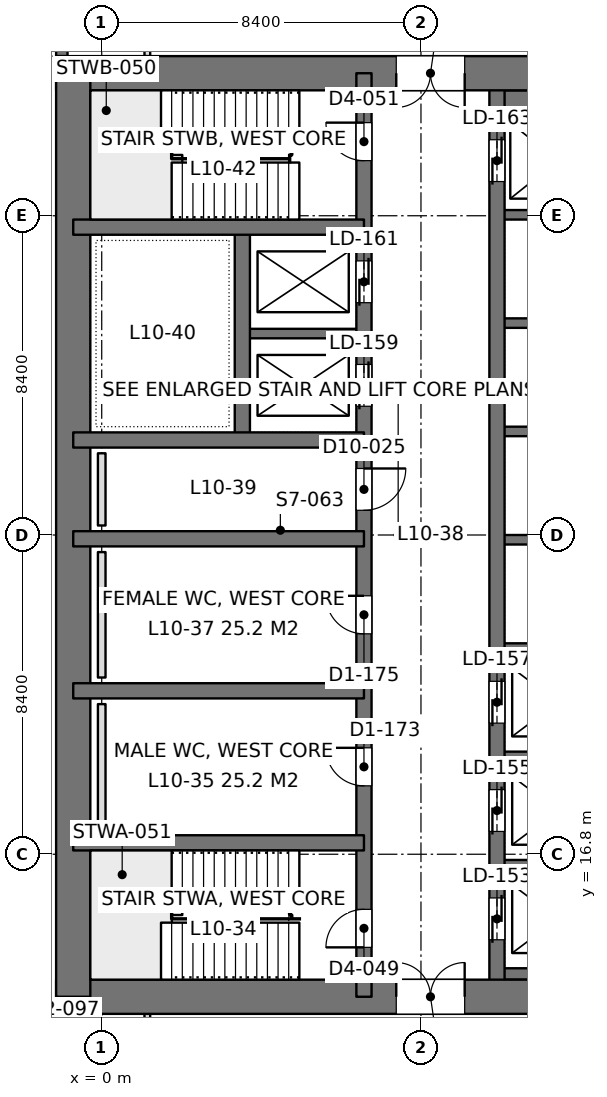
"""IFC4 building model, lengths in metres.
Left out: names, types, materials, properties, quantities, classifications, styles, units other than length and angle.
Written with IfcOpenShell. Run it as: python <this file> out.ifc"""

import sys

from ifc_helpers import new_model, si_unit, direction, frame, frame_2d, origin, place, context, subcontext, project, spatial, rectangle, extrude, element, fill, save


model = new_model("IFC4")
c1 = context("Model", 3, precision=1e-05, world=origin(), true_north=direction((0.0, 1.0)))
c2 = subcontext(c1, "Body", "Model", "MODEL_VIEW")
j1 = project(units=[si_unit("LENGTHUNIT", "METRE"), si_unit("PLANEANGLEUNIT", "RADIAN")], contexts=[c1])
p1 = place(None, origin())
s1 = spatial("IfcSite", under=j1, at=p1, CompositionType="ELEMENT")
p2 = place(p1, origin())
s2 = spatial("IfcBuilding", under=s1, at=p2, CompositionType="ELEMENT")
p3 = place(p2, frame((0.0, 0.0, 45.9)))
s3 = spatial("IfcBuildingStorey", under=s2, at=p3, CompositionType="ELEMENT", Elevation=45.9)
p4 = place(p3, frame((-1.2, 13.05, 0.0), z_axis=(0.0, 0.0, 1.0), x_axis=(1.0, 0.0, 0.0)))
e1 = element("IfcWall", 1, at=p4, inside=s3, PredefinedType="SHEAR", context=c2, shape_type="SweptSolid", body=[
    extrude(rectangle(XDim=18.0, YDim=0.9, at=frame_2d((9.0, 0.0))), origin(), (0.0, 0.0, 1.0), 4.5),
])
p5 = place(p4, frame((8.95, 0.0, 0.0)))
e2 = element("IfcOpeningElement", 2, at=p5, cuts=e1, PredefinedType="OPENING", context=c2, shape_type="SweptSolid", body=[
    extrude(rectangle(XDim=1.8, YDim=2.4, at=frame_2d((0.9, 1.2))), frame((0.0, 0.46, 0.0), z_axis=(0.0, -1.0, 0.0), x_axis=(1.0, 0.0, 0.0)), (0.0, 0.0, 1.0), 0.92),
])
p6 = place(p3, frame((-1.2, 37.35, 0.0), z_axis=(0.0, 0.0, 1.0), x_axis=(1.0, 0.0, 0.0)))
e3 = element("IfcWall", 3, at=p6, inside=s3, PredefinedType="SHEAR", context=c2, shape_type="SweptSolid", body=[
    extrude(rectangle(XDim=18.0, YDim=0.9, at=frame_2d((9.0, 0.0))), origin(), (0.0, 0.0, 1.0), 4.5),
])
p7 = place(p6, frame((8.95, 0.0, 0.0)))
e4 = element("IfcOpeningElement", 4, at=p7, cuts=e3, PredefinedType="OPENING", context=c2, shape_type="SweptSolid", body=[
    extrude(rectangle(XDim=1.8, YDim=2.4, at=frame_2d((0.9, 1.2))), frame((0.0, 0.46, 0.0), z_axis=(0.0, -1.0, 0.0), x_axis=(1.0, 0.0, 0.0)), (0.0, 0.0, 1.0), 0.92),
])
p8 = place(p3, frame((-0.75, 13.05, 0.0), z_axis=(0.0, 0.0, 1.0), x_axis=(0.0, 1.0, 0.0)))
e5 = element("IfcWall", 5, at=p8, inside=s3, PredefinedType="SHEAR", context=c2, shape_type="SweptSolid", body=[
    extrude(rectangle(XDim=24.3, YDim=0.9, at=frame_2d((12.15, 0.0))), origin(), (0.0, 0.0, 1.0), 4.5),
])
p9 = place(p3, frame((6.9, 13.05, 0.0), z_axis=(0.0, 0.0, 1.0), x_axis=(0.0, 1.0, 0.0)))
e6 = element("IfcWall", 6, at=p9, inside=s3, PredefinedType="SHEAR", context=c2, shape_type="SweptSolid", body=[
    extrude(rectangle(XDim=24.3, YDim=0.4, at=frame_2d((12.15, 0.0))), origin(), (0.0, 0.0, 1.0), 4.5),
])
p10 = place(p9, frame((1.3, 0.0, 0.0)))
e7 = element("IfcOpeningElement", 7, at=p10, cuts=e6, PredefinedType="OPENING", context=c2, shape_type="SweptSolid", body=[
    extrude(rectangle(XDim=1.0, YDim=2.2, at=frame_2d((0.5, 1.1))), frame((0.0, 0.21, 0.0), z_axis=(0.0, -1.0, 0.0), x_axis=(1.0, 0.0, 0.0)), (0.0, 0.0, 1.0), 0.42),
])
p11 = place(p9, frame((22.0, 0.0, 0.0)))
e8 = element("IfcOpeningElement", 8, at=p11, cuts=e6, PredefinedType="OPENING", context=c2, shape_type="SweptSolid", body=[
    extrude(rectangle(XDim=1.0, YDim=2.2, at=frame_2d((0.5, 1.1))), frame((0.0, 0.21, 0.0), z_axis=(0.0, -1.0, 0.0), x_axis=(1.0, 0.0, 0.0)), (0.0, 0.0, 1.0), 0.42),
])
p12 = place(p9, frame((5.55, 0.0, 0.0)))
e9 = element("IfcOpeningElement", 9, at=p12, cuts=e6, PredefinedType="OPENING", context=c2, shape_type="SweptSolid", body=[
    extrude(rectangle(XDim=1.0, YDim=2.2, at=frame_2d((0.5, 1.1))), frame((0.0, 0.21, 0.0), z_axis=(0.0, -1.0, 0.0), x_axis=(1.0, 0.0, 0.0)), (0.0, 0.0, 1.0), 0.42),
])
p13 = place(p9, frame((9.55, 0.0, 0.0)))
e10 = element("IfcOpeningElement", 10, at=p13, cuts=e6, PredefinedType="OPENING", context=c2, shape_type="SweptSolid", body=[
    extrude(rectangle(XDim=1.0, YDim=2.2, at=frame_2d((0.5, 1.1))), frame((0.0, 0.21, 0.0), z_axis=(0.0, -1.0, 0.0), x_axis=(1.0, 0.0, 0.0)), (0.0, 0.0, 1.0), 0.42),
])
p14 = place(p9, frame((12.8, 0.0, 0.0)))
e11 = element("IfcOpeningElement", 11, at=p14, cuts=e6, PredefinedType="OPENING", context=c2, shape_type="SweptSolid", body=[
    extrude(rectangle(XDim=1.1, YDim=2.2, at=frame_2d((0.55, 1.1))), frame((0.0, 0.21, 0.0), z_axis=(0.0, -1.0, 0.0), x_axis=(1.0, 0.0, 0.0)), (0.0, 0.0, 1.0), 0.42),
])
p15 = place(p9, frame((15.538, 0.0, 0.0)))
e12 = element("IfcOpeningElement", 12, at=p15, cuts=e6, PredefinedType="OPENING", context=c2, shape_type="SweptSolid", body=[
    extrude(rectangle(XDim=1.1, YDim=2.2, at=frame_2d((0.55, 1.1))), frame((0.0, 0.21, 0.0), z_axis=(0.0, -1.0, 0.0), x_axis=(1.0, 0.0, 0.0)), (0.0, 0.0, 1.0), 0.42),
])
p16 = place(p9, frame((18.262, 0.0, 0.0)))
e13 = element("IfcOpeningElement", 13, at=p16, cuts=e6, PredefinedType="OPENING", context=c2, shape_type="SweptSolid", body=[
    extrude(rectangle(XDim=1.1, YDim=2.2, at=frame_2d((0.55, 1.1))), frame((0.0, 0.21, 0.0), z_axis=(0.0, -1.0, 0.0), x_axis=(1.0, 0.0, 0.0)), (0.0, 0.0, 1.0), 0.42),
])
p17 = place(p3, frame((10.4, 13.05, 0.0), z_axis=(0.0, 0.0, 1.0), x_axis=(0.0, 1.0, 0.0)))
e14 = element("IfcWall", 14, at=p17, inside=s3, PredefinedType="SHEAR", context=c2, shape_type="SweptSolid", body=[
    extrude(rectangle(XDim=24.3, YDim=0.4, at=frame_2d((12.15, 0.0))), origin(), (0.0, 0.0, 1.0), 4.5),
])
p18 = place(p17, frame((1.5, 0.0, 0.0)))
e15 = element("IfcOpeningElement", 15, at=p18, cuts=e14, PredefinedType="OPENING", context=c2, shape_type="SweptSolid", body=[
    extrude(rectangle(XDim=1.1, YDim=2.2, at=frame_2d((0.55, 1.1))), frame((0.0, 0.21, 0.0), z_axis=(0.0, -1.0, 0.0), x_axis=(1.0, 0.0, 0.0)), (0.0, 0.0, 1.0), 0.42),
])
p19 = place(p17, frame((4.35, 0.0, 0.0)))
e16 = element("IfcOpeningElement", 16, at=p19, cuts=e14, PredefinedType="OPENING", context=c2, shape_type="SweptSolid", body=[
    extrude(rectangle(XDim=1.1, YDim=2.2, at=frame_2d((0.55, 1.1))), frame((0.0, 0.21, 0.0), z_axis=(0.0, -1.0, 0.0), x_axis=(1.0, 0.0, 0.0)), (0.0, 0.0, 1.0), 0.42),
])
p20 = place(p17, frame((7.2, 0.0, 0.0)))
e17 = element("IfcOpeningElement", 17, at=p20, cuts=e14, PredefinedType="OPENING", context=c2, shape_type="SweptSolid", body=[
    extrude(rectangle(XDim=1.1, YDim=2.2, at=frame_2d((0.55, 1.1))), frame((0.0, 0.21, 0.0), z_axis=(0.0, -1.0, 0.0), x_axis=(1.0, 0.0, 0.0)), (0.0, 0.0, 1.0), 0.42),
])
p21 = place(p17, frame((21.45, 0.0, 0.0)))
e18 = element("IfcOpeningElement", 18, at=p21, cuts=e14, PredefinedType="OPENING", context=c2, shape_type="SweptSolid", body=[
    extrude(rectangle(XDim=1.1, YDim=2.2, at=frame_2d((0.55, 1.1))), frame((0.0, 0.21, 0.0), z_axis=(0.0, -1.0, 0.0), x_axis=(1.0, 0.0, 0.0)), (0.0, 0.0, 1.0), 0.42),
])
for number, where, z_axis, x_axis in (
    (19, (-0.75, 17.1, 0.0), (0.0, 0.0, 1.0), (1.0, 0.0, 0.0)),
    (20, (-0.75, 21.1, 0.0), (0.0, 0.0, 1.0), (1.0, 0.0, 0.0)),
    (21, (-0.75, 25.1, 0.0), (0.0, 0.0, 1.0), (1.0, 0.0, 0.0)),
    (22, (-0.75, 27.7, 0.0), (0.0, 0.0, 1.0), (1.0, 0.0, 0.0)),
    (23, (-0.75, 33.3, 0.0), (0.0, 0.0, 1.0), (1.0, 0.0, 0.0)),
):
    element("IfcWall", number, at=place(p3, frame(where, z_axis=z_axis, x_axis=x_axis)), inside=s3, PredefinedType="SHEAR", context=c2, shape_type="SweptSolid", body=[
        extrude(rectangle(XDim=7.65, YDim=0.4, at=frame_2d((3.825, 0.0))), origin(), (0.0, 0.0, 1.0), 4.5),
    ])
p22 = place(p3, frame((3.7, 27.7, 0.0), z_axis=(0.0, 0.0, 1.0), x_axis=(0.0, 1.0, 0.0)))
e24 = element("IfcWall", 24, at=p22, inside=s3, PredefinedType="SHEAR", context=c2, shape_type="SweptSolid", body=[
    extrude(rectangle(XDim=5.6, YDim=0.4, at=frame_2d((2.8, 0.0))), origin(), (0.0, 0.0, 1.0), 4.5),
])
p23 = place(p3, frame((3.7, 30.5, 0.0), z_axis=(0.0, 0.0, 1.0), x_axis=(1.0, 0.0, 0.0)))
e25 = element("IfcWall", 25, at=p23, inside=s3, PredefinedType="SHEAR", context=c2, shape_type="SweptSolid", body=[
    extrude(rectangle(XDim=3.2, YDim=0.25, at=frame_2d((1.6, 0.0))), origin(), (0.0, 0.0, 1.0), 4.5),
])
p24 = place(p3, frame((10.4, 13.65, 0.0), z_axis=(0.0, 0.0, 1.0), x_axis=(1.0, 0.0, 0.0)))
e26 = element("IfcWall", 26, at=p24, inside=s3, PredefinedType="SHEAR", context=c2, shape_type="SweptSolid", body=[
    extrude(rectangle(XDim=3.2, YDim=0.3, at=frame_2d((1.6, 0.0))), origin(), (0.0, 0.0, 1.0), 4.5),
])
for number, where, z_axis, x_axis in (
    (27, (10.4, 16.525, 0.0), (0.0, 0.0, 1.0), (1.0, 0.0, 0.0)),
    (28, (10.4, 19.375, 0.0), (0.0, 0.0, 1.0), (1.0, 0.0, 0.0)),
    (29, (10.4, 22.225, 0.0), (0.0, 0.0, 1.0), (1.0, 0.0, 0.0)),
    (30, (10.4, 25.075, 0.0), (0.0, 0.0, 1.0), (1.0, 0.0, 0.0)),
    (31, (10.4, 27.925, 0.0), (0.0, 0.0, 1.0), (1.0, 0.0, 0.0)),
    (32, (10.4, 30.775, 0.0), (0.0, 0.0, 1.0), (1.0, 0.0, 0.0)),
    (33, (10.4, 33.625, 0.0), (0.0, 0.0, 1.0), (1.0, 0.0, 0.0)),
):
    element("IfcWall", number, at=place(p3, frame(where, z_axis=z_axis, x_axis=x_axis)), inside=s3, PredefinedType="SHEAR", context=c2, shape_type="SweptSolid", body=[
        extrude(rectangle(XDim=3.2, YDim=0.25, at=frame_2d((1.6, 0.0))), origin(), (0.0, 0.0, 1.0), 4.5),
    ])
p25 = place(p3, frame((10.4, 36.625, 0.0), z_axis=(0.0, 0.0, 1.0), x_axis=(1.0, 0.0, 0.0)))
e34 = element("IfcWall", 34, at=p25, inside=s3, PredefinedType="SHEAR", context=c2, shape_type="SweptSolid", body=[
    extrude(rectangle(XDim=3.2, YDim=0.55, at=frame_2d((1.6, 0.0))), origin(), (0.0, 0.0, 1.0), 4.5),
])
p26 = place(p3, frame((-1.05, 8.4, 0.0), z_axis=(0.0, 0.0, 1.0), x_axis=(0.0, 1.0, 0.0)))
e35 = element("IfcWall", 35, at=p26, inside=s3, PredefinedType="SOLIDWALL", context=c2, shape_type="SweptSolid", body=[
    extrude(rectangle(XDim=4.2, YDim=0.3, at=frame_2d((2.1, 0.0))), origin(), (0.0, 0.0, 1.0), 4.34),
])
p27 = place(p26, frame((0.9, 0.0, 0.9)))
e36 = element("IfcOpeningElement", 36, at=p27, cuts=e35, PredefinedType="OPENING", context=c2, shape_type="SweptSolid", body=[
    extrude(rectangle(XDim=2.4, YDim=1.9, at=frame_2d((1.2, 0.95))), frame((0.0, 0.16, 0.0), z_axis=(0.0, -1.0, 0.0), x_axis=(1.0, 0.0, 0.0)), (0.0, 0.0, 1.0), 0.32),
])
p28 = place(p3, frame((-1.05, 37.8, 0.0), z_axis=(0.0, 0.0, 1.0), x_axis=(0.0, 1.0, 0.0)))
e37 = element("IfcWall", 37, at=p28, inside=s3, PredefinedType="SOLIDWALL", context=c2, shape_type="SweptSolid", body=[
    extrude(rectangle(XDim=4.2, YDim=0.3, at=frame_2d((2.1, 0.0))), origin(), (0.0, 0.0, 1.0), 4.34),
])
p29 = place(p28, frame((0.9, 0.0, 0.9)))
e38 = element("IfcOpeningElement", 38, at=p29, cuts=e37, PredefinedType="OPENING", context=c2, shape_type="SweptSolid", body=[
    extrude(rectangle(XDim=2.4, YDim=1.9, at=frame_2d((1.2, 0.95))), frame((0.0, 0.16, 0.0), z_axis=(0.0, -1.0, 0.0), x_axis=(1.0, 0.0, 0.0)), (0.0, 0.0, 1.0), 0.32),
])
p30 = place(p3, frame((1.2, 10.8, 0.0), z_axis=(0.0, 0.0, 1.0), x_axis=(0.0, 1.0, 0.0)))
e39 = element("IfcWall", 39, at=p30, inside=s3, PredefinedType="PARTITIONING", context=c2, shape_type="SweptSolid", body=[
    extrude(rectangle(XDim=1.802, YDim=0.15, at=frame_2d((0.901, 0.0))), origin(), (0.0, 0.0, 1.0), 4.34),
])
p31 = place(p3, frame((1.2, 37.8, 0.0), z_axis=(0.0, 0.0, 1.0), x_axis=(0.0, 1.0, 0.0)))
e40 = element("IfcWall", 40, at=p31, inside=s3, PredefinedType="PARTITIONING", context=c2, shape_type="SweptSolid", body=[
    extrude(rectangle(XDim=1.8, YDim=0.15, at=frame_2d((0.9, 0.0))), origin(), (0.0, 0.0, 1.0), 4.34),
])
for number, where, z_axis, x_axis in (
    (41, (0.0, 17.45, 0.0), (0.0, 0.0, 1.0), (0.0, 1.0, 0.0)),
    (42, (0.0, 21.45, 0.0), (0.0, 0.0, 1.0), (0.0, 1.0, 0.0)),
):
    element("IfcWall", number, at=place(p3, frame(where, z_axis=z_axis, x_axis=x_axis)), inside=s3, PredefinedType="PLUMBINGWALL", context=c2, shape_type="SweptSolid", body=[
        extrude(rectangle(XDim=3.3, YDim=0.2, at=frame_2d((1.65, 0.0))), origin(), (0.0, 0.0, 1.0), 1.2),
    ])
p32 = place(p3, frame((0.0, 25.45, 0.0), z_axis=(0.0, 0.0, 1.0), x_axis=(0.0, 1.0, 0.0)))
e43 = element("IfcWall", 43, at=p32, inside=s3, PredefinedType="PLUMBINGWALL", context=c2, shape_type="SweptSolid", body=[
    extrude(rectangle(XDim=1.9, YDim=0.2, at=frame_2d((0.95, 0.0))), origin(), (0.0, 0.0, 1.0), 1.2),
])
p33 = place(p5, origin())
e44 = element("IfcDoor", 44, at=p33, inside=s3, OperationType="DOUBLE_DOOR_SINGLE_SWING", PredefinedType="DOOR", context=c2, shape_type="SweptSolid", body=[
    extrude(rectangle(XDim=1.8, YDim=2.4, at=frame_2d((0.9, 1.2))), frame((0.0, 0.025, 0.0), z_axis=(0.0, -1.0, 0.0), x_axis=(1.0, 0.0, 0.0)), (0.0, 0.0, 1.0), 0.05),
])
fill(e2, e44)
p34 = place(p7, frame((1.8, 0.0, 0.0), z_axis=(0.0, 0.0, 1.0), x_axis=(-1.0, 0.0, 0.0)))
e45 = element("IfcDoor", 45, at=p34, inside=s3, OperationType="DOUBLE_DOOR_SINGLE_SWING", PredefinedType="DOOR", context=c2, shape_type="SweptSolid", body=[
    extrude(rectangle(XDim=1.8, YDim=2.4, at=frame_2d((0.9, 1.2))), frame((0.0, 0.025, 0.0), z_axis=(0.0, -1.0, 0.0), x_axis=(1.0, 0.0, 0.0)), (0.0, 0.0, 1.0), 0.05),
])
fill(e4, e45)
p35 = place(p10, origin())
e46 = element("IfcDoor", 46, at=p35, inside=s3, OperationType="SINGLE_SWING_LEFT", PredefinedType="DOOR", context=c2, shape_type="SweptSolid", body=[
    extrude(rectangle(XDim=1.0, YDim=2.2, at=frame_2d((0.5, 1.1))), frame((0.0, 0.025, 0.0), z_axis=(0.0, -1.0, 0.0), x_axis=(1.0, 0.0, 0.0)), (0.0, 0.0, 1.0), 0.05),
])
fill(e7, e46)
p36 = place(p11, origin())
e47 = element("IfcDoor", 47, at=p36, inside=s3, OperationType="SINGLE_SWING_RIGHT", PredefinedType="DOOR", context=c2, shape_type="SweptSolid", body=[
    extrude(rectangle(XDim=1.0, YDim=2.2, at=frame_2d((0.5, 1.1))), frame((0.0, 0.025, 0.0), z_axis=(0.0, -1.0, 0.0), x_axis=(1.0, 0.0, 0.0)), (0.0, 0.0, 1.0), 0.05),
])
fill(e8, e47)
p37 = place(p12, origin())
e48 = element("IfcDoor", 48, at=p37, inside=s3, OperationType="SINGLE_SWING_RIGHT", PredefinedType="DOOR", context=c2, shape_type="SweptSolid", body=[
    extrude(rectangle(XDim=1.0, YDim=2.2, at=frame_2d((0.5, 1.1))), frame((0.0, 0.025, 0.0), z_axis=(0.0, -1.0, 0.0), x_axis=(1.0, 0.0, 0.0)), (0.0, 0.0, 1.0), 0.05),
])
fill(e9, e48)
p38 = place(p13, origin())
e49 = element("IfcDoor", 49, at=p38, inside=s3, OperationType="SINGLE_SWING_RIGHT", PredefinedType="DOOR", context=c2, shape_type="SweptSolid", body=[
    extrude(rectangle(XDim=1.0, YDim=2.2, at=frame_2d((0.5, 1.1))), frame((0.0, 0.025, 0.0), z_axis=(0.0, -1.0, 0.0), x_axis=(1.0, 0.0, 0.0)), (0.0, 0.0, 1.0), 0.05),
])
fill(e10, e49)
p39 = place(p14, frame((1.1, 0.0, 0.0), z_axis=(0.0, 0.0, 1.0), x_axis=(-1.0, 0.0, 0.0)))
e50 = element("IfcDoor", 50, at=p39, inside=s3, OperationType="SINGLE_SWING_LEFT", PredefinedType="DOOR", context=c2, shape_type="SweptSolid", body=[
    extrude(rectangle(XDim=1.1, YDim=2.2, at=frame_2d((0.55, 1.1))), frame((0.0, 0.025, 0.0), z_axis=(0.0, -1.0, 0.0), x_axis=(1.0, 0.0, 0.0)), (0.0, 0.0, 1.0), 0.05),
])
fill(e11, e50)
p40 = place(p18, origin())
e51 = element("IfcDoor", 51, at=p40, inside=s3, OperationType="DOUBLE_DOOR_SLIDING", PredefinedType="DOOR", context=c2, shape_type="SweptSolid", body=[
    extrude(rectangle(XDim=1.1, YDim=2.2, at=frame_2d((0.55, 1.1))), frame((0.0, 0.025, 0.0), z_axis=(0.0, -1.0, 0.0), x_axis=(1.0, 0.0, 0.0)), (0.0, 0.0, 1.0), 0.05),
])
fill(e15, e51)
p41 = place(p19, origin())
e52 = element("IfcDoor", 52, at=p41, inside=s3, OperationType="DOUBLE_DOOR_SLIDING", PredefinedType="DOOR", context=c2, shape_type="SweptSolid", body=[
    extrude(rectangle(XDim=1.1, YDim=2.2, at=frame_2d((0.55, 1.1))), frame((0.0, 0.025, 0.0), z_axis=(0.0, -1.0, 0.0), x_axis=(1.0, 0.0, 0.0)), (0.0, 0.0, 1.0), 0.05),
])
fill(e16, e52)
p42 = place(p20, origin())
e53 = element("IfcDoor", 53, at=p42, inside=s3, OperationType="DOUBLE_DOOR_SLIDING", PredefinedType="DOOR", context=c2, shape_type="SweptSolid", body=[
    extrude(rectangle(XDim=1.1, YDim=2.2, at=frame_2d((0.55, 1.1))), frame((0.0, 0.025, 0.0), z_axis=(0.0, -1.0, 0.0), x_axis=(1.0, 0.0, 0.0)), (0.0, 0.0, 1.0), 0.05),
])
fill(e17, e53)
p43 = place(p21, origin())
e54 = element("IfcDoor", 54, at=p43, inside=s3, OperationType="DOUBLE_DOOR_SLIDING", PredefinedType="DOOR", context=c2, shape_type="SweptSolid", body=[
    extrude(rectangle(XDim=1.1, YDim=2.2, at=frame_2d((0.55, 1.1))), frame((0.0, 0.025, 0.0), z_axis=(0.0, -1.0, 0.0), x_axis=(1.0, 0.0, 0.0)), (0.0, 0.0, 1.0), 0.05),
])
fill(e18, e54)
p44 = place(p15, origin())
e55 = element("IfcDoor", 55, at=p44, inside=s3, OperationType="DOUBLE_DOOR_SLIDING", PredefinedType="DOOR", context=c2, shape_type="SweptSolid", body=[
    extrude(rectangle(XDim=1.1, YDim=2.2, at=frame_2d((0.55, 1.1))), frame((0.0, 0.025, 0.0), z_axis=(0.0, -1.0, 0.0), x_axis=(1.0, 0.0, 0.0)), (0.0, 0.0, 1.0), 0.05),
])
fill(e12, e55)
p45 = place(p16, origin())
e56 = element("IfcDoor", 56, at=p45, inside=s3, OperationType="DOUBLE_DOOR_SLIDING", PredefinedType="DOOR", context=c2, shape_type="SweptSolid", body=[
    extrude(rectangle(XDim=1.1, YDim=2.2, at=frame_2d((0.55, 1.1))), frame((0.0, 0.025, 0.0), z_axis=(0.0, -1.0, 0.0), x_axis=(1.0, 0.0, 0.0)), (0.0, 0.0, 1.0), 0.05),
])
fill(e13, e56)
save(model, sys.argv[1])
